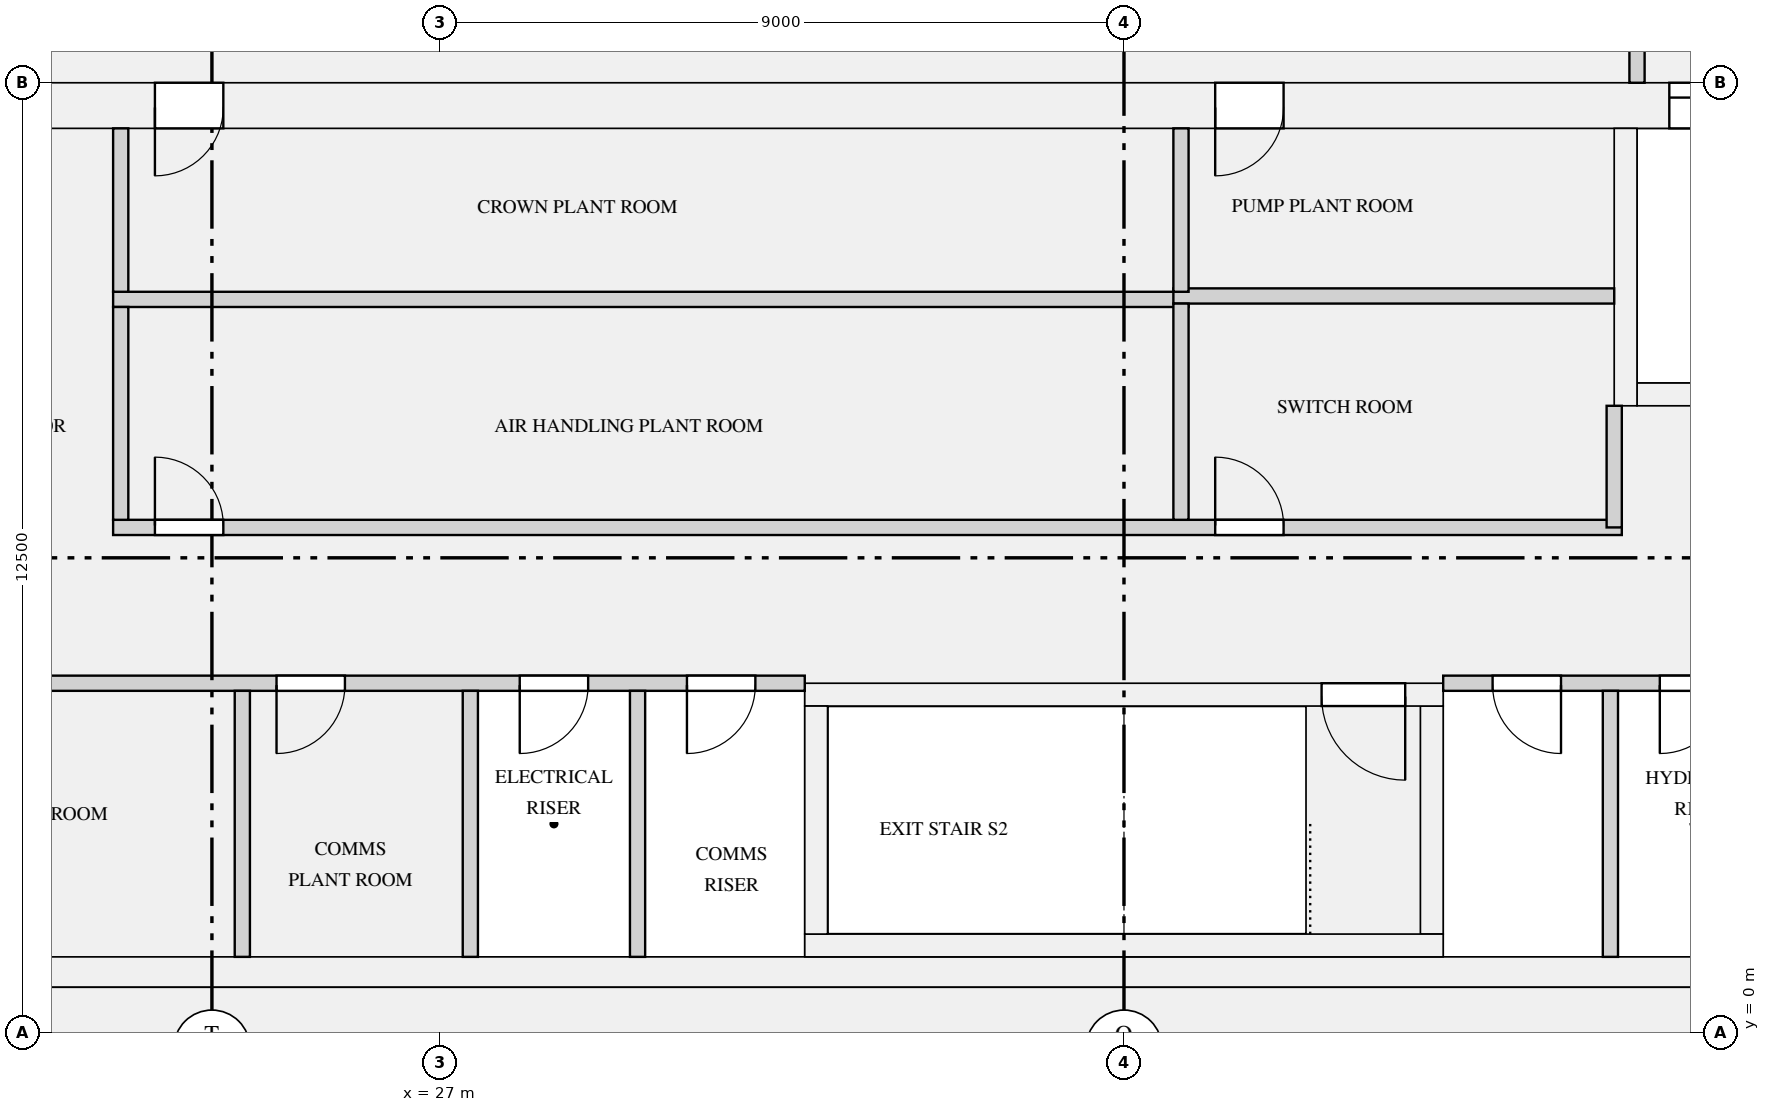
"""IFC4 building model, lengths in metres.
Left out: names, types, materials, properties, quantities, classifications, styles, units other than length and angle.
Written with IfcOpenShell. Run it as: python <this file> out.ifc"""

import sys

from ifc_helpers import new_model, si_unit, direction, frame, frame_2d, origin, place, context, subcontext, project, spatial, rectangle, extrude, element, fill, save


model = new_model("IFC4")
c1 = context("Model", 3, precision=1e-05, world=origin(), true_north=direction((0.0, 1.0)))
c2 = subcontext(c1, "Body", "Model", "MODEL_VIEW")
j1 = project(units=[si_unit("LENGTHUNIT", "METRE"), si_unit("PLANEANGLEUNIT", "RADIAN")], contexts=[c1])
p1 = place(None, origin())
s1 = spatial("IfcSite", under=j1, at=p1, CompositionType="ELEMENT")
p2 = place(p1, origin())
s2 = spatial("IfcBuilding", under=s1, at=p2, CompositionType="ELEMENT")
p3 = place(p2, frame((0.0, 0.0, 240.0)))
s3 = spatial("IfcBuildingStorey", under=s2, at=p3, CompositionType="ELEMENT", Elevation=240.0)
p4 = place(p3, frame((18.6, 0.3, 0.0), z_axis=(0.0, 0.0, 1.0), x_axis=(1.0, 0.0, 0.0)))
e1 = element("IfcWall", 1, at=p4, inside=s3, PredefinedType="SHEAR", context=c2, shape_type="SweptSolid", body=[
    extrude(rectangle(XDim=34.8, YDim=0.6, at=frame_2d((17.4, 0.0))), origin(), (0.0, 0.0, 1.0), 4.2),
])
p5 = place(p3, frame((18.6, 12.2, 0.0), z_axis=(0.0, 0.0, 1.0), x_axis=(1.0, 0.0, 0.0)))
e2 = element("IfcWall", 2, at=p5, inside=s3, PredefinedType="SHEAR", context=c2, shape_type="SweptSolid", body=[
    extrude(rectangle(XDim=34.8, YDim=0.6, at=frame_2d((17.4, 0.0))), origin(), (0.0, 0.0, 1.0), 4.2),
])
p6 = place(p5, frame((24.575, 0.0, 0.0)))
e3 = element("IfcOpeningElement", 3, at=p6, cuts=e2, PredefinedType="OPENING", context=c2, shape_type="SweptSolid", body=[
    extrude(rectangle(XDim=1.1, YDim=2.1, at=frame_2d((0.55, 1.05))), frame((0.0, 0.31, 0.0), z_axis=(0.0, -1.0, 0.0), x_axis=(1.0, 0.0, 0.0)), (0.0, 0.0, 1.0), 0.62),
])
p7 = place(p5, frame((26.825, 0.0, 0.0)))
e4 = element("IfcOpeningElement", 4, at=p7, cuts=e2, PredefinedType="OPENING", context=c2, shape_type="SweptSolid", body=[
    extrude(rectangle(XDim=1.1, YDim=2.1, at=frame_2d((0.55, 1.05))), frame((0.0, 0.31, 0.0), z_axis=(0.0, -1.0, 0.0), x_axis=(1.0, 0.0, 0.0)), (0.0, 0.0, 1.0), 0.62),
])
p8 = place(p5, frame((29.075, 0.0, 0.0)))
e5 = element("IfcOpeningElement", 5, at=p8, cuts=e2, PredefinedType="OPENING", context=c2, shape_type="SweptSolid", body=[
    extrude(rectangle(XDim=1.1, YDim=2.1, at=frame_2d((0.55, 1.05))), frame((0.0, 0.31, 0.0), z_axis=(0.0, -1.0, 0.0), x_axis=(1.0, 0.0, 0.0)), (0.0, 0.0, 1.0), 0.62),
])
p9 = place(p5, frame((18.6, 0.0, 0.0)))
e6 = element("IfcOpeningElement", 6, at=p9, cuts=e2, PredefinedType="OPENING", context=c2, shape_type="SweptSolid", body=[
    extrude(rectangle(XDim=0.9, YDim=2.1, at=frame_2d((0.45, 1.05))), frame((0.0, 0.31, 0.0), z_axis=(0.0, -1.0, 0.0), x_axis=(1.0, 0.0, 0.0)), (0.0, 0.0, 1.0), 0.62),
])
p10 = place(p5, frame((4.65, 0.0, 0.0)))
e7 = element("IfcOpeningElement", 7, at=p10, cuts=e2, PredefinedType="OPENING", context=c2, shape_type="SweptSolid", body=[
    extrude(rectangle(XDim=0.9, YDim=2.1, at=frame_2d((0.45, 1.05))), frame((0.0, 0.31, 0.0), z_axis=(0.0, -1.0, 0.0), x_axis=(1.0, 0.0, 0.0)), (0.0, 0.0, 1.0), 0.62),
])
p11 = place(p5, frame((1.55, 0.0, 0.0)))
e8 = element("IfcOpeningElement", 8, at=p11, cuts=e2, PredefinedType="OPENING", context=c2, shape_type="SweptSolid", body=[
    extrude(rectangle(XDim=1.2, YDim=2.1, at=frame_2d((0.6, 1.05))), frame((0.0, 0.31, 0.0), z_axis=(0.0, -1.0, 0.0), x_axis=(1.0, 0.0, 0.0)), (0.0, 0.0, 1.0), 0.62),
])
p12 = place(p5, frame((32.05, 0.0, 0.0)))
e9 = element("IfcOpeningElement", 9, at=p12, cuts=e2, PredefinedType="OPENING", context=c2, shape_type="SweptSolid", body=[
    extrude(rectangle(XDim=1.2, YDim=2.1, at=frame_2d((0.6, 1.05))), frame((0.0, 0.31, 0.0), z_axis=(0.0, -1.0, 0.0), x_axis=(1.0, 0.0, 0.0)), (0.0, 0.0, 1.0), 0.62),
])
p13 = place(p3, frame((18.6, 0.8, 0.0), z_axis=(0.0, 0.0, 1.0), x_axis=(1.0, 0.0, 0.0)))
e10 = element("IfcWall", 10, at=p13, inside=s3, PredefinedType="SHEAR", context=c2, shape_type="SweptSolid", body=[
    extrude(rectangle(XDim=34.8, YDim=0.4, at=frame_2d((17.4, 0.0))), origin(), (0.0, 0.0, 1.0), 4.2),
])
p14 = place(p3, frame((42.75, 8.4, 0.0), z_axis=(0.0, 0.0, 1.0), x_axis=(1.0, 0.0, 0.0)))
e11 = element("IfcWall", 11, at=p14, inside=s3, PredefinedType="SHEAR", context=c2, shape_type="SweptSolid", body=[
    extrude(rectangle(XDim=1.95, YDim=0.3, at=frame_2d((0.975, 0.0))), origin(), (0.0, 0.0, 1.0), 4.2),
])
p15 = place(p3, frame((42.6, 8.25, 0.0), z_axis=(0.0, 0.0, 1.0), x_axis=(0.0, 1.0, 0.0)))
e12 = element("IfcWall", 12, at=p15, inside=s3, PredefinedType="SHEAR", context=c2, shape_type="SweptSolid", body=[
    extrude(rectangle(XDim=3.65, YDim=0.3, at=frame_2d((1.825, 0.0))), origin(), (0.0, 0.0, 1.0), 4.2),
])
p16 = place(p3, frame((31.8, 1.15, 0.0), z_axis=(0.0, 0.0, 1.0), x_axis=(1.0, 0.0, 0.0)))
e13 = element("IfcWall", 13, at=p16, inside=s3, PredefinedType="SHEAR", context=c2, shape_type="SweptSolid", body=[
    extrude(rectangle(XDim=8.4, YDim=0.3, at=frame_2d((4.2, 0.0))), origin(), (0.0, 0.0, 1.0), 4.2),
])
p17 = place(p3, frame((31.8, 4.45, 0.0), z_axis=(0.0, 0.0, 1.0), x_axis=(1.0, 0.0, 0.0)))
e14 = element("IfcWall", 14, at=p17, inside=s3, PredefinedType="SHEAR", context=c2, shape_type="SweptSolid", body=[
    extrude(rectangle(XDim=8.4, YDim=0.3, at=frame_2d((4.2, 0.0))), origin(), (0.0, 0.0, 1.0), 4.2),
])
p18 = place(p17, frame((6.8, 0.0, 0.0)))
e15 = element("IfcOpeningElement", 15, at=p18, cuts=e14, PredefinedType="OPENING", context=c2, shape_type="SweptSolid", body=[
    extrude(rectangle(XDim=1.1, YDim=2.1, at=frame_2d((0.55, 1.05))), frame((0.0, 0.16, 0.0), z_axis=(0.0, -1.0, 0.0), x_axis=(1.0, 0.0, 0.0)), (0.0, 0.0, 1.0), 0.32),
])
for number, where, z_axis, x_axis in (
    (16, (31.95, 1.3, 0.0), (0.0, 0.0, 1.0), (0.0, 1.0, 0.0)),
    (17, (40.05, 1.3, 0.0), (0.0, 0.0, 1.0), (0.0, 1.0, 0.0)),
):
    element("IfcWall", number, at=place(p3, frame(where, z_axis=z_axis, x_axis=x_axis)), inside=s3, PredefinedType="SHEAR", context=c2, shape_type="SweptSolid", body=[
        extrude(rectangle(XDim=3.0, YDim=0.3, at=frame_2d((1.5, 0.0))), origin(), (0.0, 0.0, 1.0), 4.2),
    ])
p19 = place(p3, frame((19.0, 4.6, 0.0), z_axis=(0.0, 0.0, 1.0), x_axis=(1.0, 0.0, 0.0)))
e18 = element("IfcWall", 18, at=p19, inside=s3, PredefinedType="PARTITIONING", context=c2, shape_type="SweptSolid", body=[
    extrude(rectangle(XDim=12.8, YDim=0.2, at=frame_2d((6.4, 0.0))), origin(), (0.0, 0.0, 1.0), 3.85),
])
p20 = place(p19, frame((0.45, 0.0, 0.0)))
e19 = element("IfcOpeningElement", 19, at=p20, cuts=e18, PredefinedType="OPENING", context=c2, shape_type="SweptSolid", body=[
    extrude(rectangle(XDim=0.9, YDim=2.1, at=frame_2d((0.45, 1.05))), frame((0.0, 0.11, 0.0), z_axis=(0.0, -1.0, 0.0), x_axis=(1.0, 0.0, 0.0)), (0.0, 0.0, 1.0), 0.22),
])
p21 = place(p19, frame((5.85, 0.0, 0.0)))
e20 = element("IfcOpeningElement", 20, at=p21, cuts=e18, PredefinedType="OPENING", context=c2, shape_type="SweptSolid", body=[
    extrude(rectangle(XDim=0.9, YDim=2.1, at=frame_2d((0.45, 1.05))), frame((0.0, 0.11, 0.0), z_axis=(0.0, -1.0, 0.0), x_axis=(1.0, 0.0, 0.0)), (0.0, 0.0, 1.0), 0.22),
])
p22 = place(p19, frame((9.05, 0.0, 0.0)))
e21 = element("IfcOpeningElement", 21, at=p22, cuts=e18, PredefinedType="OPENING", context=c2, shape_type="SweptSolid", body=[
    extrude(rectangle(XDim=0.9, YDim=2.1, at=frame_2d((0.45, 1.05))), frame((0.0, 0.11, 0.0), z_axis=(0.0, -1.0, 0.0), x_axis=(1.0, 0.0, 0.0)), (0.0, 0.0, 1.0), 0.22),
])
p23 = place(p19, frame((11.25, 0.0, 0.0)))
e22 = element("IfcOpeningElement", 22, at=p23, cuts=e18, PredefinedType="OPENING", context=c2, shape_type="SweptSolid", body=[
    extrude(rectangle(XDim=0.9, YDim=2.1, at=frame_2d((0.45, 1.05))), frame((0.0, 0.11, 0.0), z_axis=(0.0, -1.0, 0.0), x_axis=(1.0, 0.0, 0.0)), (0.0, 0.0, 1.0), 0.22),
])
p24 = place(p3, frame((40.2, 4.6, 0.0), z_axis=(0.0, 0.0, 1.0), x_axis=(1.0, 0.0, 0.0)))
e23 = element("IfcWall", 23, at=p24, inside=s3, PredefinedType="PARTITIONING", context=c2, shape_type="SweptSolid", body=[
    extrude(rectangle(XDim=12.8, YDim=0.2, at=frame_2d((6.4, 0.0))), origin(), (0.0, 0.0, 1.0), 3.85),
])
p25 = place(p24, frame((4.85, 0.0, 0.0)))
e24 = element("IfcOpeningElement", 24, at=p25, cuts=e23, PredefinedType="OPENING", context=c2, shape_type="SweptSolid", body=[
    extrude(rectangle(XDim=0.9, YDim=2.1, at=frame_2d((0.45, 1.05))), frame((0.0, 0.11, 0.0), z_axis=(0.0, -1.0, 0.0), x_axis=(1.0, 0.0, 0.0)), (0.0, 0.0, 1.0), 0.22),
])
p26 = place(p24, frame((10.25, 0.0, 0.0)))
e25 = element("IfcOpeningElement", 25, at=p26, cuts=e23, PredefinedType="OPENING", context=c2, shape_type="SweptSolid", body=[
    extrude(rectangle(XDim=0.9, YDim=2.1, at=frame_2d((0.45, 1.05))), frame((0.0, 0.11, 0.0), z_axis=(0.0, -1.0, 0.0), x_axis=(1.0, 0.0, 0.0)), (0.0, 0.0, 1.0), 0.22),
])
p27 = place(p24, frame((0.65, 0.0, 0.0)))
e26 = element("IfcOpeningElement", 26, at=p27, cuts=e23, PredefinedType="OPENING", context=c2, shape_type="SweptSolid", body=[
    extrude(rectangle(XDim=0.9, YDim=2.1, at=frame_2d((0.45, 1.05))), frame((0.0, 0.11, 0.0), z_axis=(0.0, -1.0, 0.0), x_axis=(1.0, 0.0, 0.0)), (0.0, 0.0, 1.0), 0.22),
])
p28 = place(p24, frame((2.85, 0.0, 0.0)))
e27 = element("IfcOpeningElement", 27, at=p28, cuts=e23, PredefinedType="OPENING", context=c2, shape_type="SweptSolid", body=[
    extrude(rectangle(XDim=0.9, YDim=2.1, at=frame_2d((0.45, 1.05))), frame((0.0, 0.11, 0.0), z_axis=(0.0, -1.0, 0.0), x_axis=(1.0, 0.0, 0.0)), (0.0, 0.0, 1.0), 0.22),
])
p29 = place(p3, frame((22.7, 6.65, 0.0), z_axis=(0.0, 0.0, 1.0), x_axis=(1.0, 0.0, 0.0)))
e28 = element("IfcWall", 28, at=p29, inside=s3, PredefinedType="PARTITIONING", context=c2, shape_type="SweptSolid", body=[
    extrude(rectangle(XDim=19.85, YDim=0.2, at=frame_2d((9.925, 0.0))), origin(), (0.0, 0.0, 1.0), 3.85),
])
p30 = place(p29, frame((14.5, 0.0, 0.0)))
e29 = element("IfcOpeningElement", 29, at=p30, cuts=e28, PredefinedType="OPENING", context=c2, shape_type="SweptSolid", body=[
    extrude(rectangle(XDim=0.9, YDim=2.1, at=frame_2d((0.45, 1.05))), frame((0.0, 0.11, 0.0), z_axis=(0.0, -1.0, 0.0), x_axis=(1.0, 0.0, 0.0)), (0.0, 0.0, 1.0), 0.22),
])
p31 = place(p29, frame((0.55, 0.0, 0.0)))
e30 = element("IfcOpeningElement", 30, at=p31, cuts=e28, PredefinedType="OPENING", context=c2, shape_type="SweptSolid", body=[
    extrude(rectangle(XDim=0.9, YDim=2.1, at=frame_2d((0.45, 1.05))), frame((0.0, 0.11, 0.0), z_axis=(0.0, -1.0, 0.0), x_axis=(1.0, 0.0, 0.0)), (0.0, 0.0, 1.0), 0.22),
])
p32 = place(p3, frame((22.7, 9.65, 0.0), z_axis=(0.0, 0.0, 1.0), x_axis=(1.0, 0.0, 0.0)))
e31 = element("IfcWall", 31, at=p32, inside=s3, PredefinedType="PARTITIONING", context=c2, shape_type="SweptSolid", body=[
    extrude(rectangle(XDim=14.15, YDim=0.2, at=frame_2d((7.075, 0.0))), origin(), (0.0, 0.0, 1.0), 3.85),
])
p33 = place(p3, frame((36.65, 9.695, 0.0), z_axis=(0.0, 0.0, 1.0), x_axis=(1.0, 0.0, 0.0)))
e32 = element("IfcWall", 32, at=p33, inside=s3, PredefinedType="PARTITIONING", context=c2, shape_type="SweptSolid", body=[
    extrude(rectangle(XDim=5.8, YDim=0.2, at=frame_2d((2.9, 0.0))), origin(), (0.0, 0.0, 1.0), 3.85),
])
for number, where, z_axis, x_axis in (
    (33, (24.4, 1.0, 0.0), (0.0, 0.0, 1.0), (0.0, 1.0, 0.0)),
    (34, (27.4, 1.0, 0.0), (0.0, 0.0, 1.0), (0.0, 1.0, 0.0)),
    (35, (29.6, 1.0, 0.0), (0.0, 0.0, 1.0), (0.0, 1.0, 0.0)),
    (36, (42.4, 1.0, 0.0), (0.0, 0.0, 1.0), (0.0, 1.0, 0.0)),
):
    element("IfcWall", number, at=place(p3, frame(where, z_axis=z_axis, x_axis=x_axis)), inside=s3, PredefinedType="PARTITIONING", context=c2, shape_type="SweptSolid", body=[
        extrude(rectangle(XDim=3.5, YDim=0.2, at=frame_2d((1.75, 0.0))), origin(), (0.0, 0.0, 1.0), 3.85),
    ])
p34 = place(p3, frame((42.45, 6.65, 0.0), z_axis=(0.0, 0.0, 1.0), x_axis=(0.0, 1.0, 0.0)))
e37 = element("IfcWall", 37, at=p34, inside=s3, PredefinedType="PARTITIONING", context=c2, shape_type="SweptSolid", body=[
    extrude(rectangle(XDim=1.6, YDim=0.2, at=frame_2d((0.8, 0.0))), origin(), (0.0, 0.0, 1.0), 3.85),
])
p35 = place(p3, frame((22.8, 6.75, 0.0), z_axis=(0.0, 0.0, 1.0), x_axis=(0.0, 1.0, 0.0)))
e38 = element("IfcWall", 38, at=p35, inside=s3, PredefinedType="PARTITIONING", context=c2, shape_type="SweptSolid", body=[
    extrude(rectangle(XDim=2.8, YDim=0.2, at=frame_2d((1.4, 0.0))), origin(), (0.0, 0.0, 1.0), 3.85),
])
p36 = place(p3, frame((36.75, 6.75, 0.0), z_axis=(0.0, 0.0, 1.0), x_axis=(0.0, 1.0, 0.0)))
e39 = element("IfcWall", 39, at=p36, inside=s3, PredefinedType="PARTITIONING", context=c2, shape_type="SweptSolid", body=[
    extrude(rectangle(XDim=2.845, YDim=0.2, at=frame_2d((1.422, 0.0))), origin(), (0.0, 0.0, 1.0), 3.85),
])
for number, where, z_axis, x_axis in (
    (40, (22.8, 9.75, 0.0), (0.0, 0.0, 1.0), (0.0, 1.0, 0.0)),
    (41, (36.75, 9.75, 0.0), (0.0, 0.0, 1.0), (0.0, 1.0, 0.0)),
):
    element("IfcWall", number, at=place(p3, frame(where, z_axis=z_axis, x_axis=x_axis)), inside=s3, PredefinedType="PARTITIONING", context=c2, shape_type="SweptSolid", body=[
        extrude(rectangle(XDim=2.15, YDim=0.2, at=frame_2d((1.075, 0.0))), origin(), (0.0, 0.0, 1.0), 3.85),
    ])
p37 = place(p3, frame((42.75, 12.5, 0.0), z_axis=(0.0, 0.0, 1.0), x_axis=(0.0, 1.0, 0.0)))
e42 = element("IfcWall", 42, at=p37, inside=s3, PredefinedType="PARTITIONING", context=c2, shape_type="SweptSolid", body=[
    extrude(rectangle(XDim=3.4, YDim=0.2, at=frame_2d((1.7, 0.0))), origin(), (0.0, 0.0, 1.0), 3.85),
])
p38 = place(p37, frame((2.2, 0.0, 0.0)))
e43 = element("IfcOpeningElement", 43, at=p38, cuts=e42, PredefinedType="OPENING", context=c2, shape_type="SweptSolid", body=[
    extrude(rectangle(XDim=1.0, YDim=2.1, at=frame_2d((0.5, 1.05))), frame((0.0, 0.11, 0.0), z_axis=(0.0, -1.0, 0.0), x_axis=(1.0, 0.0, 0.0)), (0.0, 0.0, 1.0), 0.22),
])
p39 = place(p6, origin())
e44 = element("IfcDoor", 44, at=p39, inside=s3, OperationType="DOUBLE_DOOR_SLIDING", PredefinedType="DOOR", context=c2, shape_type="SweptSolid", body=[
    extrude(rectangle(XDim=1.1, YDim=2.1, at=frame_2d((0.55, 1.05))), frame((0.0, 0.025, 0.0), z_axis=(0.0, -1.0, 0.0), x_axis=(1.0, 0.0, 0.0)), (0.0, 0.0, 1.0), 0.05),
])
fill(e3, e44)
p40 = place(p18, frame((1.1, 0.0, 0.0), z_axis=(0.0, 0.0, 1.0), x_axis=(-1.0, 0.0, 0.0)))
e45 = element("IfcDoor", 45, at=p40, inside=s3, OperationType="SINGLE_SWING_LEFT", PredefinedType="DOOR", context=c2, shape_type="SweptSolid", body=[
    extrude(rectangle(XDim=1.1, YDim=2.1, at=frame_2d((0.55, 1.05))), frame((0.0, 0.025, 0.0), z_axis=(0.0, -1.0, 0.0), x_axis=(1.0, 0.0, 0.0)), (0.0, 0.0, 1.0), 0.05),
])
fill(e15, e45)
p41 = place(p21, frame((0.9, 0.0, 0.0), z_axis=(0.0, 0.0, 1.0), x_axis=(-1.0, 0.0, 0.0)))
e46 = element("IfcDoor", 46, at=p41, inside=s3, OperationType="SINGLE_SWING_RIGHT", PredefinedType="DOOR", context=c2, shape_type="SweptSolid", body=[
    extrude(rectangle(XDim=0.9, YDim=2.1, at=frame_2d((0.45, 1.05))), frame((0.0, 0.025, 0.0), z_axis=(0.0, -1.0, 0.0), x_axis=(1.0, 0.0, 0.0)), (0.0, 0.0, 1.0), 0.05),
])
fill(e20, e46)
p42 = place(p30, origin())
e47 = element("IfcDoor", 47, at=p42, inside=s3, OperationType="SINGLE_SWING_LEFT", PredefinedType="DOOR", context=c2, shape_type="SweptSolid", body=[
    extrude(rectangle(XDim=0.9, YDim=2.1, at=frame_2d((0.45, 1.05))), frame((0.0, 0.025, 0.0), z_axis=(0.0, -1.0, 0.0), x_axis=(1.0, 0.0, 0.0)), (0.0, 0.0, 1.0), 0.05),
])
fill(e29, e47)
p43 = place(p9, frame((0.9, 0.0, 0.0), z_axis=(0.0, 0.0, 1.0), x_axis=(-1.0, 0.0, 0.0)))
e48 = element("IfcDoor", 48, at=p43, inside=s3, OperationType="SINGLE_SWING_RIGHT", PredefinedType="DOOR", context=c2, shape_type="SweptSolid", body=[
    extrude(rectangle(XDim=0.9, YDim=2.1, at=frame_2d((0.45, 1.05))), frame((0.0, 0.025, 0.0), z_axis=(0.0, -1.0, 0.0), x_axis=(1.0, 0.0, 0.0)), (0.0, 0.0, 1.0), 0.05),
])
fill(e6, e48)
p44 = place(p10, frame((0.9, 0.0, 0.0), z_axis=(0.0, 0.0, 1.0), x_axis=(-1.0, 0.0, 0.0)))
e49 = element("IfcDoor", 49, at=p44, inside=s3, OperationType="SINGLE_SWING_RIGHT", PredefinedType="DOOR", context=c2, shape_type="SweptSolid", body=[
    extrude(rectangle(XDim=0.9, YDim=2.1, at=frame_2d((0.45, 1.05))), frame((0.0, 0.025, 0.0), z_axis=(0.0, -1.0, 0.0), x_axis=(1.0, 0.0, 0.0)), (0.0, 0.0, 1.0), 0.05),
])
fill(e7, e49)
p45 = place(p31, origin())
e50 = element("IfcDoor", 50, at=p45, inside=s3, OperationType="SINGLE_SWING_LEFT", PredefinedType="DOOR", context=c2, shape_type="SweptSolid", body=[
    extrude(rectangle(XDim=0.9, YDim=2.1, at=frame_2d((0.45, 1.05))), frame((0.0, 0.025, 0.0), z_axis=(0.0, -1.0, 0.0), x_axis=(1.0, 0.0, 0.0)), (0.0, 0.0, 1.0), 0.05),
])
fill(e30, e50)
p46 = place(p22, frame((0.9, 0.0, 0.0), z_axis=(0.0, 0.0, 1.0), x_axis=(-1.0, 0.0, 0.0)))
e51 = element("IfcDoor", 51, at=p46, inside=s3, OperationType="SINGLE_SWING_RIGHT", PredefinedType="DOOR", context=c2, shape_type="SweptSolid", body=[
    extrude(rectangle(XDim=0.9, YDim=2.1, at=frame_2d((0.45, 1.05))), frame((0.0, 0.025, 0.0), z_axis=(0.0, -1.0, 0.0), x_axis=(1.0, 0.0, 0.0)), (0.0, 0.0, 1.0), 0.05),
])
fill(e21, e51)
p47 = place(p23, frame((0.9, 0.0, 0.0), z_axis=(0.0, 0.0, 1.0), x_axis=(-1.0, 0.0, 0.0)))
e52 = element("IfcDoor", 52, at=p47, inside=s3, OperationType="SINGLE_SWING_RIGHT", PredefinedType="DOOR", context=c2, shape_type="SweptSolid", body=[
    extrude(rectangle(XDim=0.9, YDim=2.1, at=frame_2d((0.45, 1.05))), frame((0.0, 0.025, 0.0), z_axis=(0.0, -1.0, 0.0), x_axis=(1.0, 0.0, 0.0)), (0.0, 0.0, 1.0), 0.05),
])
fill(e22, e52)
p48 = place(p27, frame((0.9, 0.0, 0.0), z_axis=(0.0, 0.0, 1.0), x_axis=(-1.0, 0.0, 0.0)))
e53 = element("IfcDoor", 53, at=p48, inside=s3, OperationType="SINGLE_SWING_LEFT", PredefinedType="DOOR", context=c2, shape_type="SweptSolid", body=[
    extrude(rectangle(XDim=0.9, YDim=2.1, at=frame_2d((0.45, 1.05))), frame((0.0, 0.025, 0.0), z_axis=(0.0, -1.0, 0.0), x_axis=(1.0, 0.0, 0.0)), (0.0, 0.0, 1.0), 0.05),
])
fill(e26, e53)
p49 = place(p28, frame((0.9, 0.0, 0.0), z_axis=(0.0, 0.0, 1.0), x_axis=(-1.0, 0.0, 0.0)))
e54 = element("IfcDoor", 54, at=p49, inside=s3, OperationType="SINGLE_SWING_RIGHT", PredefinedType="DOOR", context=c2, shape_type="SweptSolid", body=[
    extrude(rectangle(XDim=0.9, YDim=2.1, at=frame_2d((0.45, 1.05))), frame((0.0, 0.025, 0.0), z_axis=(0.0, -1.0, 0.0), x_axis=(1.0, 0.0, 0.0)), (0.0, 0.0, 1.0), 0.05),
])
fill(e27, e54)
save(model, sys.argv[1])
